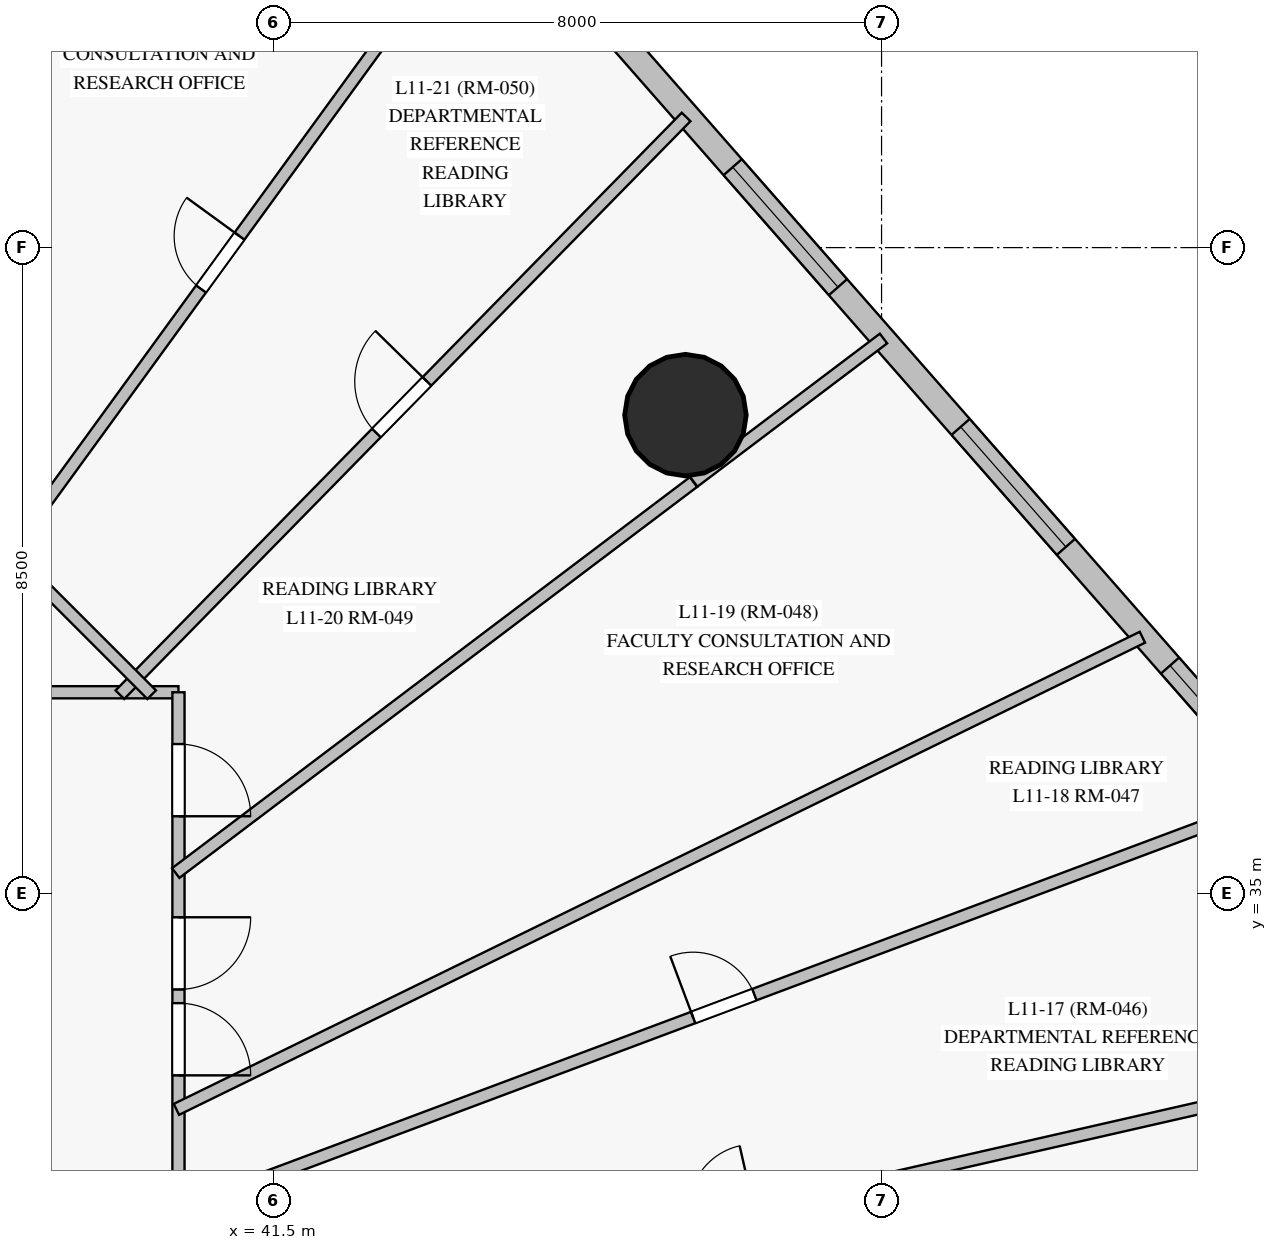
"""IFC4 building model, lengths in metres.
Left out: names, types, materials, properties, quantities, classifications, styles, units other than length and angle.
Written with IfcOpenShell. Run it as: python <this file> out.ifc"""

import sys

from ifc_helpers import new_model, si_unit, direction, frame, frame_2d, origin, origin_with_axes, origin_2d, place, context, subcontext, project, spatial, rectangle, circle, extrude, source, transform, mapped, element, fill, save


model = new_model("IFC4")
c1 = context("Model", 3, precision=1e-05, world=origin(), true_north=direction((0.0, 1.0)))
c2 = subcontext(c1, "Body", "Model", "MODEL_VIEW")
j1 = project(units=[si_unit("LENGTHUNIT", "METRE"), si_unit("PLANEANGLEUNIT", "RADIAN")], contexts=[c1])
p1 = place(None, origin())
s1 = spatial("IfcSite", under=j1, at=p1, CompositionType="ELEMENT")
p2 = place(p1, origin())
s2 = spatial("IfcBuilding", under=s1, at=p2, CompositionType="ELEMENT")
p3 = place(p2, frame((0.0, 0.0, 44.5)))
s3 = spatial("IfcBuildingStorey", under=s2, at=p3, CompositionType="ELEMENT", Elevation=44.5)
m1 = source(origin_with_axes(), c2, "Body", "SweptSolid", [
    extrude(circle(Radius=0.8, at=origin_2d()), origin(), (0.0, 0.0, 1.0), 3.6),
])
p4 = place(p3, frame((46.92, 41.296, 0.0), z_axis=(0.0, 0.0, 1.0), x_axis=(1.0, 0.0, 0.0)))
e1 = element("IfcColumn", 1, at=p4, inside=s3, PredefinedType="COLUMN", context=c2, shape_type="MappedRepresentation", body=[
    mapped(m1, transform((0.0, 0.0, 0.0), scale=1.0)),
])
p5 = place(p3, frame((54.673, 36.431, 0.0), z_axis=(0.0, 0.0, 1.0), x_axis=(-0.659567357533, 0.751645462221, 0.0)))
e2 = element("IfcWall", 2, at=p5, inside=s3, PredefinedType="SOLIDWALL", context=c2, shape_type="SweptSolid", body=[
    extrude(rectangle(XDim=13.117, YDim=0.32, at=frame_2d((6.558, 0.0))), origin(), (0.0, 0.0, 1.0), 3.35),
])
p6 = place(p5, frame((0.589, 0.0, 0.85)))
e3 = element("IfcOpeningElement", 3, at=p6, cuts=e2, PredefinedType="OPENING", context=c2, shape_type="SweptSolid", body=[
    extrude(rectangle(XDim=1.5, YDim=1.85, at=frame_2d((0.75, 0.925))), frame((0.0, 0.17, 0.0), z_axis=(0.0, -1.0, 0.0), x_axis=(1.0, 0.0, 0.0)), (0.0, 0.0, 1.0), 0.34),
])
p7 = place(p5, frame((4.166, 0.0, 0.85)))
e4 = element("IfcOpeningElement", 4, at=p7, cuts=e2, PredefinedType="OPENING", context=c2, shape_type="SweptSolid", body=[
    extrude(rectangle(XDim=2.1, YDim=1.95, at=frame_2d((1.05, 0.975))), frame((0.0, 0.17, 0.0), z_axis=(0.0, -1.0, 0.0), x_axis=(1.0, 0.0, 0.0)), (0.0, 0.0, 1.0), 0.34),
])
p8 = place(p5, frame((8.712, 0.0, 0.85)))
e5 = element("IfcOpeningElement", 5, at=p8, cuts=e2, PredefinedType="OPENING", context=c2, shape_type="SweptSolid", body=[
    extrude(rectangle(XDim=2.1, YDim=1.95, at=frame_2d((1.05, 0.975))), frame((0.0, 0.17, 0.0), z_axis=(0.0, -1.0, 0.0), x_axis=(1.0, 0.0, 0.0)), (0.0, 0.0, 1.0), 0.34),
])
p9 = place(p3, frame((10.5, 37.65, 0.0), z_axis=(0.0, 0.0, 1.0), x_axis=(1.0, 0.0, 0.0)))
e6 = element("IfcWall", 6, at=p9, inside=s3, PredefinedType="PARTITIONING", context=c2, shape_type="SweptSolid", body=[
    extrude(rectangle(XDim=29.75, YDim=0.16, at=frame_2d((14.875, 0.0))), origin(), (0.0, 0.0, 1.0), 2.75),
])
p10 = place(p9, frame((21.927, 0.0, 0.0)))
e7 = element("IfcOpeningElement", 7, at=p10, cuts=e6, PredefinedType="OPENING", context=c2, shape_type="SweptSolid", body=[
    extrude(rectangle(XDim=0.95, YDim=2.15, at=frame_2d((0.475, 1.075))), frame((0.0, 0.09, 0.0), z_axis=(0.0, -1.0, 0.0), x_axis=(1.0, 0.0, 0.0)), (0.0, 0.0, 1.0), 0.18),
])
p11 = place(p9, frame((20.262, 0.0, 0.0)))
e8 = element("IfcOpeningElement", 8, at=p11, cuts=e6, PredefinedType="OPENING", context=c2, shape_type="SweptSolid", body=[
    extrude(rectangle(XDim=0.95, YDim=2.15, at=frame_2d((0.475, 1.075))), frame((0.0, 0.09, 0.0), z_axis=(0.0, -1.0, 0.0), x_axis=(1.0, 0.0, 0.0)), (0.0, 0.0, 1.0), 0.18),
])
p12 = place(p9, frame((18.722, 0.0, 0.0)))
e9 = element("IfcOpeningElement", 9, at=p12, cuts=e6, PredefinedType="OPENING", context=c2, shape_type="SweptSolid", body=[
    extrude(rectangle(XDim=0.95, YDim=2.15, at=frame_2d((0.475, 1.075))), frame((0.0, 0.09, 0.0), z_axis=(0.0, -1.0, 0.0), x_axis=(1.0, 0.0, 0.0)), (0.0, 0.0, 1.0), 0.18),
])
p13 = place(p9, frame((14.4, 0.0, 0.0)))
e10 = element("IfcOpeningElement", 10, at=p13, cuts=e6, PredefinedType="OPENING", context=c2, shape_type="SweptSolid", body=[
    extrude(rectangle(XDim=0.95, YDim=2.15, at=frame_2d((0.475, 1.075))), frame((0.0, 0.09, 0.0), z_axis=(0.0, -1.0, 0.0), x_axis=(1.0, 0.0, 0.0)), (0.0, 0.0, 1.0), 0.18),
])
p14 = place(p9, frame((6.962, 0.0, 0.0)))
e11 = element("IfcOpeningElement", 11, at=p14, cuts=e6, PredefinedType="OPENING", context=c2, shape_type="SweptSolid", body=[
    extrude(rectangle(XDim=0.95, YDim=2.15, at=frame_2d((0.475, 1.075))), frame((0.0, 0.09, 0.0), z_axis=(0.0, -1.0, 0.0), x_axis=(1.0, 0.0, 0.0)), (0.0, 0.0, 1.0), 0.18),
])
p15 = place(p3, frame((40.25, 37.65, 0.0), z_axis=(0.0, 0.0, 1.0), x_axis=(0.0, -1.0, 0.0)))
e12 = element("IfcWall", 12, at=p15, inside=s3, PredefinedType="PARTITIONING", context=c2, shape_type="SweptSolid", body=[
    extrude(rectangle(XDim=22.3, YDim=0.16, at=frame_2d((11.15, 0.0))), origin(), (0.0, 0.0, 1.0), 2.75),
])
p16 = place(p15, frame((14.02, 0.0, 0.0)))
e13 = element("IfcOpeningElement", 13, at=p16, cuts=e12, PredefinedType="OPENING", context=c2, shape_type="SweptSolid", body=[
    extrude(rectangle(XDim=0.95, YDim=2.15, at=frame_2d((0.475, 1.075))), frame((0.0, 0.09, 0.0), z_axis=(0.0, -1.0, 0.0), x_axis=(1.0, 0.0, 0.0)), (0.0, 0.0, 1.0), 0.18),
])
p17 = place(p15, frame((11.115, 0.0, 0.0)))
e14 = element("IfcOpeningElement", 14, at=p17, cuts=e12, PredefinedType="OPENING", context=c2, shape_type="SweptSolid", body=[
    extrude(rectangle(XDim=0.95, YDim=2.15, at=frame_2d((0.475, 1.075))), frame((0.0, 0.09, 0.0), z_axis=(0.0, -1.0, 0.0), x_axis=(1.0, 0.0, 0.0)), (0.0, 0.0, 1.0), 0.18),
])
p18 = place(p15, frame((7.397, 0.0, 0.0)))
e15 = element("IfcOpeningElement", 15, at=p18, cuts=e12, PredefinedType="OPENING", context=c2, shape_type="SweptSolid", body=[
    extrude(rectangle(XDim=0.86, YDim=2.1, at=frame_2d((0.43, 1.05))), frame((0.0, 0.09, 0.0), z_axis=(0.0, -1.0, 0.0), x_axis=(1.0, 0.0, 0.0)), (0.0, 0.0, 1.0), 0.18),
])
p19 = place(p15, frame((4.09, 0.0, 0.0)))
e16 = element("IfcOpeningElement", 16, at=p19, cuts=e12, PredefinedType="OPENING", context=c2, shape_type="SweptSolid", body=[
    extrude(rectangle(XDim=0.95, YDim=2.15, at=frame_2d((0.475, 1.075))), frame((0.0, 0.09, 0.0), z_axis=(0.0, -1.0, 0.0), x_axis=(1.0, 0.0, 0.0)), (0.0, 0.0, 1.0), 0.18),
])
p20 = place(p15, frame((2.96, 0.0, 0.0)))
e17 = element("IfcOpeningElement", 17, at=p20, cuts=e12, PredefinedType="OPENING", context=c2, shape_type="SweptSolid", body=[
    extrude(rectangle(XDim=0.95, YDim=2.15, at=frame_2d((0.475, 1.075))), frame((0.0, 0.09, 0.0), z_axis=(0.0, -1.0, 0.0), x_axis=(1.0, 0.0, 0.0)), (0.0, 0.0, 1.0), 0.18),
])
p21 = place(p15, frame((0.681, 0.0, 0.0)))
e18 = element("IfcOpeningElement", 18, at=p21, cuts=e12, PredefinedType="OPENING", context=c2, shape_type="SweptSolid", body=[
    extrude(rectangle(XDim=0.95, YDim=2.15, at=frame_2d((0.475, 1.075))), frame((0.0, 0.09, 0.0), z_axis=(0.0, -1.0, 0.0), x_axis=(1.0, 0.0, 0.0)), (0.0, 0.0, 1.0), 0.18),
])
p22 = place(p15, frame((15.145, 0.0, 0.0)))
e19 = element("IfcOpeningElement", 19, at=p22, cuts=e12, PredefinedType="OPENING", context=c2, shape_type="SweptSolid", body=[
    extrude(rectangle(XDim=0.95, YDim=2.15, at=frame_2d((0.475, 1.075))), frame((0.0, 0.09, 0.0), z_axis=(0.0, -1.0, 0.0), x_axis=(1.0, 0.0, 0.0)), (0.0, 0.0, 1.0), 0.18),
])
p23 = place(p15, frame((9.752, 0.0, 0.0)))
e20 = element("IfcOpeningElement", 20, at=p23, cuts=e12, PredefinedType="OPENING", context=c2, shape_type="SweptSolid", body=[
    extrude(rectangle(XDim=0.86, YDim=2.04, at=frame_2d((0.43, 1.02))), frame((0.0, 0.09, 0.0), z_axis=(0.0, -1.0, 0.0), x_axis=(1.0, 0.0, 0.0)), (0.0, 0.0, 1.0), 0.18),
])
p24 = place(p3, frame((40.208, 30.82, 0.0), z_axis=(0.0, 0.0, 1.0), x_axis=(0.936503538723, 0.350658126897, 0.0)))
e21 = element("IfcWall", 21, at=p24, inside=s3, PredefinedType="PARTITIONING", context=c2, shape_type="SweptSolid", body=[
    extrude(rectangle(XDim=15.411, YDim=0.16, at=frame_2d((7.706, 0.0))), origin(), (0.0, 0.0, 1.0), 3.35),
])
p25 = place(p24, frame((7.276, 0.0, 0.0)))
e22 = element("IfcOpeningElement", 22, at=p25, cuts=e21, PredefinedType="OPENING", context=c2, shape_type="SweptSolid", body=[
    extrude(rectangle(XDim=0.86, YDim=2.04, at=frame_2d((0.43, 1.02))), frame((0.0, 0.09, 0.0), z_axis=(0.0, -1.0, 0.0), x_axis=(1.0, 0.0, 0.0)), (0.0, 0.0, 1.0), 0.18),
])
p26 = place(p3, frame((40.221, 29.111, 0.0), z_axis=(0.0, 0.0, 1.0), x_axis=(0.974973940849, 0.22231917296, 0.0)))
e23 = element("IfcWall", 23, at=p26, inside=s3, PredefinedType="PARTITIONING", context=c2, shape_type="SweptSolid", body=[
    extrude(rectangle(XDim=14.737, YDim=0.16, at=frame_2d((7.369, 0.0))), origin(), (0.0, 0.0, 1.0), 3.35),
])
p27 = place(p26, frame((6.938, 0.0, 0.0)))
e24 = element("IfcOpeningElement", 24, at=p27, cuts=e23, PredefinedType="OPENING", context=c2, shape_type="SweptSolid", body=[
    extrude(rectangle(XDim=0.86, YDim=2.04, at=frame_2d((0.43, 1.02))), frame((0.0, 0.09, 0.0), z_axis=(0.0, -1.0, 0.0), x_axis=(1.0, 0.0, 0.0)), (0.0, 0.0, 1.0), 0.18),
])
p28 = place(p3, frame((40.223, 32.163, 0.0), z_axis=(0.0, 0.0, 1.0), x_axis=(0.898436111138, 0.439104263477, 0.0)))
e25 = element("IfcWall", 25, at=p28, inside=s3, PredefinedType="PARTITIONING", context=c2, shape_type="SweptSolid", body=[
    extrude(rectangle(XDim=14.146, YDim=0.16, at=frame_2d((7.073, 0.0))), origin(), (0.0, 0.0, 1.0), 3.35),
])
p29 = place(p3, frame((39.479, 37.618, 0.0), z_axis=(0.0, 0.0, 1.0), x_axis=(0.699936539368, 0.714205041187, 0.0)))
e26 = element("IfcWall", 26, at=p29, inside=s3, PredefinedType="PARTITIONING", context=c2, shape_type="SweptSolid", body=[
    extrude(rectangle(XDim=10.643, YDim=0.16, at=frame_2d((5.321, 0.0))), origin(), (0.0, 0.0, 1.0), 3.35),
])
p30 = place(p29, frame((4.821, 0.0, 0.0)))
e27 = element("IfcOpeningElement", 27, at=p30, cuts=e26, PredefinedType="OPENING", context=c2, shape_type="SweptSolid", body=[
    extrude(rectangle(XDim=0.95, YDim=2.15, at=frame_2d((0.475, 1.075))), frame((0.0, 0.09, 0.0), z_axis=(0.0, -1.0, 0.0), x_axis=(1.0, 0.0, 0.0)), (0.0, 0.0, 1.0), 0.18),
])
p31 = place(p3, frame((38.026, 39.49, 0.0), z_axis=(0.0, 0.0, 1.0), x_axis=(0.588360998561, 0.808598377053, 0.0)))
e28 = element("IfcWall", 28, at=p31, inside=s3, PredefinedType="PARTITIONING", context=c2, shape_type="SweptSolid", body=[
    extrude(rectangle(XDim=9.431, YDim=0.16, at=frame_2d((4.716, 0.0))), origin(), (0.0, 0.0, 1.0), 3.35),
])
p32 = place(p31, frame((4.286, 0.0, 0.0)))
e29 = element("IfcOpeningElement", 29, at=p32, cuts=e28, PredefinedType="OPENING", context=c2, shape_type="SweptSolid", body=[
    extrude(rectangle(XDim=0.86, YDim=2.04, at=frame_2d((0.43, 1.02))), frame((0.0, 0.09, 0.0), z_axis=(0.0, -1.0, 0.0), x_axis=(1.0, 0.0, 0.0)), (0.0, 0.0, 1.0), 0.18),
])
p33 = place(p3, frame((40.214, 35.271, 0.0), z_axis=(0.0, 0.0, 1.0), x_axis=(0.797987752762, 0.602673664965, 0.0)))
e30 = element("IfcWall", 30, at=p33, inside=s3, PredefinedType="PARTITIONING", context=c2, shape_type="SweptSolid", body=[
    extrude(rectangle(XDim=8.536, YDim=0.16, at=frame_2d((4.268, 0.0))), origin(), (0.0, 0.0, 1.0), 3.35),
])
p34 = place(p3, frame((35.52, 41.102, 0.0), z_axis=(0.0, 0.0, 1.0), x_axis=(0.429957308005, 0.902849219578, 0.0)))
e31 = element("IfcWall", 31, at=p34, inside=s3, PredefinedType="PARTITIONING", context=c2, shape_type="SweptSolid", body=[
    extrude(rectangle(XDim=8.387, YDim=0.16, at=frame_2d((4.194, 0.0))), origin(), (0.0, 0.0, 1.0), 3.35),
])
p35 = place(p3, frame((39.898, 37.618, 0.0), z_axis=(0.0, 0.0, 1.0), x_axis=(-0.707106781187, 0.707106781187, 0.0)))
e32 = element("IfcWall", 32, at=p35, inside=s3, PredefinedType="PARTITIONING", context=c2, shape_type="SweptSolid", body=[
    extrude(rectangle(XDim=2.647, YDim=0.16, at=frame_2d((1.324, 0.0))), origin(), (0.0, 0.0, 1.0), 2.75),
])
p36 = place(p3, frame((47.03, 40.419, 0.0), z_axis=(0.0, 0.0, 1.0), x_axis=(0.798019150984, 0.602632088975, 0.0)))
e33 = element("IfcWall", 33, at=p36, inside=s3, PredefinedType="PARTITIONING", context=c2, shape_type="SweptSolid", body=[
    extrude(rectangle(XDim=3.127, YDim=0.16, at=frame_2d((1.564, 0.0))), origin(), (0.0, 0.0, 1.0), 3.35),
])
m2 = source(origin_with_axes(), c2, "Body", "SweptSolid", [
    extrude(rectangle(XDim=1.5, YDim=1.85, at=frame_2d((0.75, 0.925))), frame((0.0, 0.03, 0.0), z_axis=(0.0, -1.0, 0.0), x_axis=(1.0, 0.0, 0.0)), (0.0, 0.0, 1.0), 0.06),
])
p37 = place(p6, origin())
e34 = element("IfcWindow", 34, at=p37, inside=s3, PartitioningType="SINGLE_PANEL", PredefinedType="WINDOW", context=c2, shape_type="MappedRepresentation", body=[
    mapped(m2, transform((0.0, 0.0, 0.0), scale=1.0)),
])
fill(e3, e34)
m3 = source(origin_with_axes(), c2, "Body", "SweptSolid", [
    extrude(rectangle(XDim=2.1, YDim=1.95, at=frame_2d((1.05, 0.975))), frame((0.0, 0.03, 0.0), z_axis=(0.0, -1.0, 0.0), x_axis=(1.0, 0.0, 0.0)), (0.0, 0.0, 1.0), 0.06),
])
p38 = place(p7, origin())
e35 = element("IfcWindow", 35, at=p38, inside=s3, PartitioningType="SINGLE_PANEL", PredefinedType="WINDOW", context=c2, shape_type="MappedRepresentation", body=[
    mapped(m3, transform((0.0, 0.0, 0.0), scale=1.0)),
])
fill(e4, e35)
p39 = place(p8, origin())
e36 = element("IfcWindow", 36, at=p39, inside=s3, PartitioningType="SINGLE_PANEL", PredefinedType="WINDOW", context=c2, shape_type="MappedRepresentation", body=[
    mapped(m3, transform((0.0, 0.0, 0.0), scale=1.0)),
])
fill(e5, e36)
m4 = source(origin_with_axes(), c2, "Body", "SweptSolid", [
    extrude(rectangle(XDim=0.95, YDim=2.15, at=frame_2d((0.475, 1.075))), frame((0.0, 0.025, 0.0), z_axis=(0.0, -1.0, 0.0), x_axis=(1.0, 0.0, 0.0)), (0.0, 0.0, 1.0), 0.05),
])
p40 = place(p19, origin())
e37 = element("IfcDoor", 37, at=p40, inside=s3, OperationType="SINGLE_SWING_RIGHT", PredefinedType="DOOR", context=c2, shape_type="MappedRepresentation", body=[
    mapped(m4, transform((0.0, 0.0, 0.0), scale=1.0)),
])
fill(e16, e37)
p41 = place(p20, origin())
e38 = element("IfcDoor", 38, at=p41, inside=s3, OperationType="SINGLE_SWING_LEFT", PredefinedType="DOOR", context=c2, shape_type="MappedRepresentation", body=[
    mapped(m4, transform((0.0, 0.0, 0.0), scale=1.0)),
])
fill(e17, e38)
p42 = place(p21, origin())
e39 = element("IfcDoor", 39, at=p42, inside=s3, OperationType="SINGLE_SWING_RIGHT", PredefinedType="DOOR", context=c2, shape_type="MappedRepresentation", body=[
    mapped(m4, transform((0.0, 0.0, 0.0), scale=1.0)),
])
fill(e18, e39)
p43 = place(p30, origin())
e40 = element("IfcDoor", 40, at=p43, inside=s3, OperationType="SINGLE_SWING_RIGHT", PredefinedType="DOOR", context=c2, shape_type="MappedRepresentation", body=[
    mapped(m4, transform((0.0, 0.0, 0.0), scale=1.0)),
])
fill(e27, e40)
m5 = source(origin_with_axes(), c2, "Body", "SweptSolid", [
    extrude(rectangle(XDim=0.86, YDim=2.04, at=frame_2d((0.43, 1.02))), frame((0.0, 0.025, 0.0), z_axis=(0.0, -1.0, 0.0), x_axis=(1.0, 0.0, 0.0)), (0.0, 0.0, 1.0), 0.05),
])
p44 = place(p25, origin())
e41 = element("IfcDoor", 41, at=p44, inside=s3, OperationType="SINGLE_SWING_LEFT", PredefinedType="DOOR", context=c2, shape_type="MappedRepresentation", body=[
    mapped(m5, transform((0.0, 0.0, 0.0), scale=1.0)),
])
fill(e22, e41)
p45 = place(p32, origin())
e42 = element("IfcDoor", 42, at=p45, inside=s3, OperationType="SINGLE_SWING_RIGHT", PredefinedType="DOOR", context=c2, shape_type="MappedRepresentation", body=[
    mapped(m5, transform((0.0, 0.0, 0.0), scale=1.0)),
])
fill(e29, e42)
save(model, sys.argv[1])
